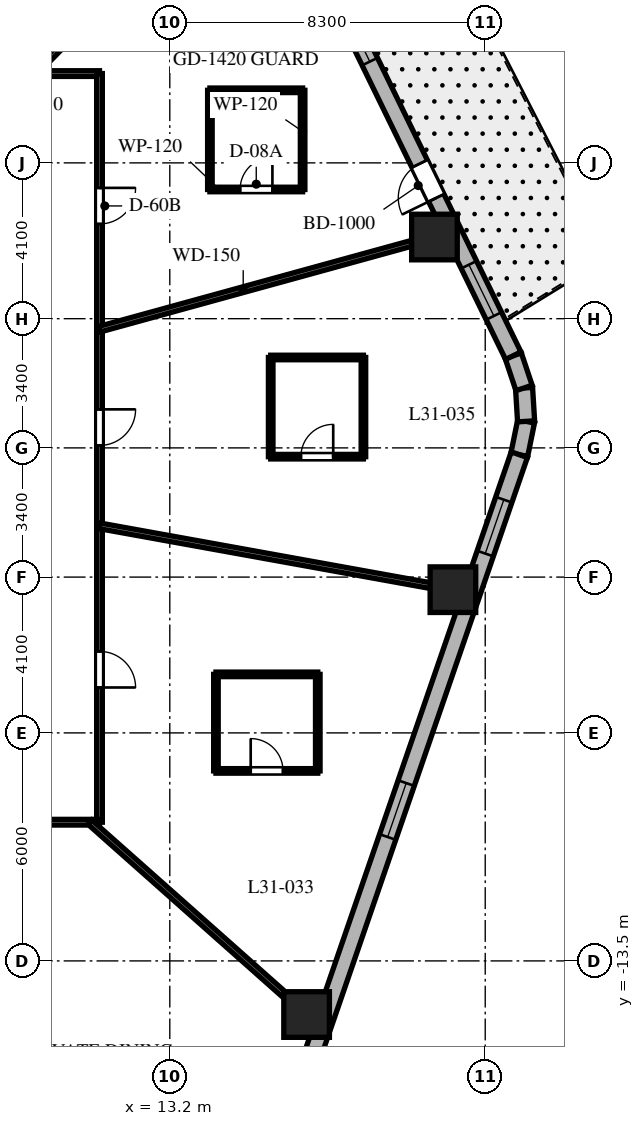
"""IFC4 building model, lengths in metres.
Left out: names, types, materials, properties, quantities, classifications, styles, units other than length and angle.
Written with IfcOpenShell. Run it as: python <this file> out.ifc"""

import sys

from ifc_helpers import new_model, si_unit, direction, frame, frame_2d, origin, origin_2d, place, context, subcontext, project, spatial, rectangle, extrude, element, fill, save


model = new_model("IFC4")
c1 = context("Model", 3, precision=1e-05, world=origin(), true_north=direction((0.0, 1.0)))
c2 = subcontext(c1, "Body", "Model", "MODEL_VIEW")
j1 = project(units=[si_unit("LENGTHUNIT", "METRE"), si_unit("PLANEANGLEUNIT", "RADIAN")], contexts=[c1])
p1 = place(None, origin())
s1 = spatial("IfcSite", under=j1, at=p1, CompositionType="ELEMENT")
p2 = place(p1, origin())
s2 = spatial("IfcBuilding", under=s1, at=p2, CompositionType="ELEMENT")
p3 = place(p2, frame((0.0, 0.0, 128.4)))
s3 = spatial("IfcBuildingStorey", under=s2, at=p3, CompositionType="ELEMENT", Elevation=128.4)
for number, where, z_axis, x_axis in (
    (1, (16.8, -14.911, 0.0), (0.0, 0.0, 1.0), (1.0, 0.0, 0.0)),
    (2, (20.65, -3.731, 0.0), (0.0, 0.0, 1.0), (1.0, 0.0, 0.0)),
    (3, (20.164, 5.549, 0.0), (0.0, 0.0, 1.0), (1.0, 0.0, 0.0)),
):
    element("IfcColumn", number, at=place(p3, frame(where, z_axis=z_axis, x_axis=x_axis)), inside=s3, PredefinedType="COLUMN", context=c2, shape_type="SweptSolid", body=[
        extrude(rectangle(XDim=1.2, YDim=1.2, at=origin_2d()), origin(), (0.0, 0.0, 1.0), 3.7),
    ])
p4 = place(p3, frame((22.397, -0.179, 0.0), z_axis=(0.0, 0.0, 1.0), x_axis=(0.199313589404, 0.979935759669, 0.0)))
e4 = element("IfcWall", 4, at=p4, inside=s3, PredefinedType="SOLIDWALL", context=c2, shape_type="SweptSolid", body=[
    extrude(rectangle(XDim=0.896, YDim=0.45, at=frame_2d((0.448, 0.0))), origin(), (0.0, 0.0, 1.0), 3.4),
])
p5 = place(p3, frame((22.575, 0.698, 0.0), z_axis=(0.0, 0.0, 1.0), x_axis=(-0.060980441946, 0.998138961117, 0.0)))
e5 = element("IfcWall", 5, at=p5, inside=s3, PredefinedType="SOLIDWALL", context=c2, shape_type="SweptSolid", body=[
    extrude(rectangle(XDim=0.881, YDim=0.45, at=frame_2d((0.44, 0.0))), origin(), (0.0, 0.0, 1.0), 3.4),
])
p6 = place(p3, frame((22.522, 1.577, 0.0), z_axis=(0.0, 0.0, 1.0), x_axis=(-0.317372694837, 0.948300887151, 0.0)))
e6 = element("IfcWall", 6, at=p6, inside=s3, PredefinedType="SOLIDWALL", context=c2, shape_type="SweptSolid", body=[
    extrude(rectangle(XDim=0.896, YDim=0.45, at=frame_2d((0.448, 0.0))), origin(), (0.0, 0.0, 1.0), 3.4),
])
p7 = place(p3, frame((15.992, -18.777, 0.0), z_axis=(0.0, 0.0, 1.0), x_axis=(0.325606988926, 0.945505202927, 0.0)))
e7 = element("IfcWall", 7, at=p7, inside=s3, PredefinedType="SOLIDWALL", context=c2, shape_type="SweptSolid", body=[
    extrude(rectangle(XDim=19.669, YDim=0.45, at=frame_2d((9.835, 0.0))), origin(), (0.0, 0.0, 1.0), 3.4),
])
p8 = place(p7, frame((1.197, 0.0, 0.8)))
e8 = element("IfcOpeningElement", 8, at=p8, cuts=e7, PredefinedType="OPENING", context=c2, shape_type="SweptSolid", body=[
    extrude(rectangle(XDim=1.5, YDim=1.8, at=frame_2d((0.75, 0.9))), frame((0.0, 0.235, 0.0), z_axis=(0.0, -1.0, 0.0), x_axis=(1.0, 0.0, 0.0)), (0.0, 0.0, 1.0), 0.47),
])
p9 = place(p7, frame((9.03, 0.0, 0.8)))
e9 = element("IfcOpeningElement", 9, at=p9, cuts=e7, PredefinedType="OPENING", context=c2, shape_type="SweptSolid", body=[
    extrude(rectangle(XDim=1.5, YDim=1.8, at=frame_2d((0.75, 0.9))), frame((0.0, 0.235, 0.0), z_axis=(0.0, -1.0, 0.0), x_axis=(1.0, 0.0, 0.0)), (0.0, 0.0, 1.0), 0.47),
])
p10 = place(p7, frame((16.918, 0.0, 0.8)))
e10 = element("IfcOpeningElement", 10, at=p10, cuts=e7, PredefinedType="OPENING", context=c2, shape_type="SweptSolid", body=[
    extrude(rectangle(XDim=1.5, YDim=1.8, at=frame_2d((0.75, 0.9))), frame((0.0, 0.235, 0.0), z_axis=(0.0, -1.0, 0.0), x_axis=(1.0, 0.0, 0.0)), (0.0, 0.0, 1.0), 0.47),
])
p11 = place(p3, frame((22.238, 2.427, 0.0), z_axis=(0.0, 0.0, 1.0), x_axis=(-0.438374803278, 0.898792262901, 0.0)))
e11 = element("IfcWall", 11, at=p11, inside=s3, PredefinedType="SOLIDWALL", context=c2, shape_type="SweptSolid", body=[
    extrude(rectangle(XDim=18.618, YDim=0.45, at=frame_2d((9.309, 0.0))), origin(), (0.0, 0.0, 1.0), 3.4),
])
p12 = place(p11, frame((4.62, 0.0, 0.0)))
e12 = element("IfcOpeningElement", 12, at=p12, cuts=e11, PredefinedType="OPENING", context=c2, shape_type="SweptSolid", body=[
    extrude(rectangle(XDim=1.0, YDim=2.15, at=frame_2d((0.5, 1.075))), frame((0.0, 0.235, 0.0), z_axis=(0.0, -1.0, 0.0), x_axis=(1.0, 0.0, 0.0)), (0.0, 0.0, 1.0), 0.47),
])
p13 = place(p11, frame((8.61, 0.0, 0.8)))
e13 = element("IfcOpeningElement", 13, at=p13, cuts=e11, PredefinedType="OPENING", context=c2, shape_type="SweptSolid", body=[
    extrude(rectangle(XDim=1.5, YDim=1.8, at=frame_2d((0.75, 0.9))), frame((0.0, 0.235, 0.0), z_axis=(0.0, -1.0, 0.0), x_axis=(1.0, 0.0, 0.0)), (0.0, 0.0, 1.0), 0.47),
])
p14 = place(p11, frame((16.006, 0.0, 0.8)))
e14 = element("IfcOpeningElement", 14, at=p14, cuts=e11, PredefinedType="OPENING", context=c2, shape_type="SweptSolid", body=[
    extrude(rectangle(XDim=1.5, YDim=1.8, at=frame_2d((0.75, 0.9))), frame((0.0, 0.235, 0.0), z_axis=(0.0, -1.0, 0.0), x_axis=(1.0, 0.0, 0.0)), (0.0, 0.0, 1.0), 0.47),
])
p15 = place(p11, frame((1.163, 0.0, 0.8)))
e15 = element("IfcOpeningElement", 15, at=p15, cuts=e11, PredefinedType="OPENING", context=c2, shape_type="SweptSolid", body=[
    extrude(rectangle(XDim=1.5, YDim=1.8, at=frame_2d((0.75, 0.9))), frame((0.0, 0.235, 0.0), z_axis=(0.0, -1.0, 0.0), x_axis=(1.0, 0.0, 0.0)), (0.0, 0.0, 1.0), 0.47),
])
p16 = place(p3, frame((-11.35, 9.85, 0.0), z_axis=(0.0, 0.0, 1.0), x_axis=(1.0, 0.0, 0.0)))
e16 = element("IfcWall", 16, at=p16, inside=s3, PredefinedType="PARTITIONING", context=c2, shape_type="SweptSolid", body=[
    extrude(rectangle(XDim=22.7, YDim=0.15, at=frame_2d((11.35, 0.0))), origin(), (0.0, 0.0, 1.0), 2.84),
])
p17 = place(p16, frame((17.237, 0.0, 0.0)))
e17 = element("IfcOpeningElement", 17, at=p17, cuts=e16, PredefinedType="OPENING", context=c2, shape_type="SweptSolid", body=[
    extrude(rectangle(XDim=0.95, YDim=2.03, at=frame_2d((0.475, 1.015))), frame((0.0, 0.085, 0.0), z_axis=(0.0, -1.0, 0.0), x_axis=(1.0, 0.0, 0.0)), (0.0, 0.0, 1.0), 0.17),
])
p18 = place(p16, frame((11.994, 0.0, 0.0)))
e18 = element("IfcOpeningElement", 18, at=p18, cuts=e16, PredefinedType="OPENING", context=c2, shape_type="SweptSolid", body=[
    extrude(rectangle(XDim=0.95, YDim=2.03, at=frame_2d((0.475, 1.015))), frame((0.0, 0.085, 0.0), z_axis=(0.0, -1.0, 0.0), x_axis=(1.0, 0.0, 0.0)), (0.0, 0.0, 1.0), 0.17),
])
p19 = place(p16, frame((8.559, 0.0, 0.0)))
e19 = element("IfcOpeningElement", 19, at=p19, cuts=e16, PredefinedType="OPENING", context=c2, shape_type="SweptSolid", body=[
    extrude(rectangle(XDim=0.95, YDim=2.03, at=frame_2d((0.475, 1.015))), frame((0.0, 0.085, 0.0), z_axis=(0.0, -1.0, 0.0), x_axis=(1.0, 0.0, 0.0)), (0.0, 0.0, 1.0), 0.17),
])
p20 = place(p16, frame((3.399, 0.0, 0.0)))
e20 = element("IfcOpeningElement", 20, at=p20, cuts=e16, PredefinedType="OPENING", context=c2, shape_type="SweptSolid", body=[
    extrude(rectangle(XDim=0.95, YDim=2.03, at=frame_2d((0.475, 1.015))), frame((0.0, 0.085, 0.0), z_axis=(0.0, -1.0, 0.0), x_axis=(1.0, 0.0, 0.0)), (0.0, 0.0, 1.0), 0.17),
])
p21 = place(p3, frame((11.35, 9.85, 0.0), z_axis=(0.0, 0.0, 1.0), x_axis=(0.0, -1.0, 0.0)))
e21 = element("IfcWall", 21, at=p21, inside=s3, PredefinedType="PARTITIONING", context=c2, shape_type="SweptSolid", body=[
    extrude(rectangle(XDim=19.7, YDim=0.15, at=frame_2d((9.85, 0.0))), origin(), (0.0, 0.0, 1.0), 2.84),
])
p22 = place(p21, frame((3.008, 0.0, 0.0)))
e22 = element("IfcOpeningElement", 22, at=p22, cuts=e21, PredefinedType="OPENING", context=c2, shape_type="SweptSolid", body=[
    extrude(rectangle(XDim=0.95, YDim=2.03, at=frame_2d((0.475, 1.015))), frame((0.0, 0.085, 0.0), z_axis=(0.0, -1.0, 0.0), x_axis=(1.0, 0.0, 0.0)), (0.0, 0.0, 1.0), 0.17),
])
p23 = place(p21, frame((15.205, 0.0, 0.0)))
e23 = element("IfcOpeningElement", 23, at=p23, cuts=e21, PredefinedType="OPENING", context=c2, shape_type="SweptSolid", body=[
    extrude(rectangle(XDim=0.95, YDim=2.03, at=frame_2d((0.475, 1.015))), frame((0.0, 0.085, 0.0), z_axis=(0.0, -1.0, 0.0), x_axis=(1.0, 0.0, 0.0)), (0.0, 0.0, 1.0), 0.17),
])
p24 = place(p21, frame((8.836, 0.0, 0.0)))
e24 = element("IfcOpeningElement", 24, at=p24, cuts=e21, PredefinedType="OPENING", context=c2, shape_type="SweptSolid", body=[
    extrude(rectangle(XDim=0.95, YDim=2.03, at=frame_2d((0.475, 1.015))), frame((0.0, 0.085, 0.0), z_axis=(0.0, -1.0, 0.0), x_axis=(1.0, 0.0, 0.0)), (0.0, 0.0, 1.0), 0.17),
])
p25 = place(p3, frame((11.35, -9.85, 0.0), z_axis=(0.0, 0.0, 1.0), x_axis=(-1.0, 0.0, 0.0)))
e25 = element("IfcWall", 25, at=p25, inside=s3, PredefinedType="PARTITIONING", context=c2, shape_type="SweptSolid", body=[
    extrude(rectangle(XDim=22.7, YDim=0.15, at=frame_2d((11.35, 0.0))), origin(), (0.0, 0.0, 1.0), 2.84),
])
p26 = place(p25, frame((17.237, 0.0, 0.0)))
e26 = element("IfcOpeningElement", 26, at=p26, cuts=e25, PredefinedType="OPENING", context=c2, shape_type="SweptSolid", body=[
    extrude(rectangle(XDim=0.95, YDim=2.03, at=frame_2d((0.475, 1.015))), frame((0.0, 0.085, 0.0), z_axis=(0.0, -1.0, 0.0), x_axis=(1.0, 0.0, 0.0)), (0.0, 0.0, 1.0), 0.17),
])
p27 = place(p25, frame((10.45, 0.0, 0.0)))
e27 = element("IfcOpeningElement", 27, at=p27, cuts=e25, PredefinedType="OPENING", context=c2, shape_type="SweptSolid", body=[
    extrude(rectangle(XDim=0.95, YDim=2.03, at=frame_2d((0.475, 1.015))), frame((0.0, 0.085, 0.0), z_axis=(0.0, -1.0, 0.0), x_axis=(1.0, 0.0, 0.0)), (0.0, 0.0, 1.0), 0.17),
])
p28 = place(p25, frame((3.399, 0.0, 0.0)))
e28 = element("IfcOpeningElement", 28, at=p28, cuts=e25, PredefinedType="OPENING", context=c2, shape_type="SweptSolid", body=[
    extrude(rectangle(XDim=0.95, YDim=2.03, at=frame_2d((0.475, 1.015))), frame((0.0, 0.085, 0.0), z_axis=(0.0, -1.0, 0.0), x_axis=(1.0, 0.0, 0.0)), (0.0, 0.0, 1.0), 0.17),
])
p29 = place(p3, frame((11.35, 3.123, 0.0), z_axis=(0.0, 0.0, 1.0), x_axis=(0.964151983214, 0.265350623261, 0.0)))
e29 = element("IfcWall", 29, at=p29, inside=s3, PredefinedType="PARTITIONING", context=c2, shape_type="SweptSolid", body=[
    extrude(rectangle(XDim=9.645, YDim=0.15, at=frame_2d((4.823, 0.0))), origin(), (0.0, 0.0, 1.0), 2.54),
])
p30 = place(p3, frame((9.628, 9.85, 0.0), z_axis=(0.0, 0.0, 1.0), x_axis=(0.698992824326, 0.715128681805, 0.0)))
e30 = element("IfcWall", 30, at=p30, inside=s3, PredefinedType="PARTITIONING", context=c2, shape_type="SweptSolid", body=[
    extrude(rectangle(XDim=8.579, YDim=0.15, at=frame_2d((4.29, 0.0))), origin(), (0.0, 0.0, 1.0), 2.54),
])
p31 = place(p3, frame((11.098, -9.85, 0.0), z_axis=(0.0, 0.0, 1.0), x_axis=(0.747904295103, -0.663806572253, 0.0)))
e31 = element("IfcWall", 31, at=p31, inside=s3, PredefinedType="PARTITIONING", context=c2, shape_type="SweptSolid", body=[
    extrude(rectangle(XDim=8.16, YDim=0.15, at=frame_2d((4.08, 0.0))), origin(), (0.0, 0.0, 1.0), 2.54),
])
p32 = place(p3, frame((11.35, -2.051, 0.0), z_axis=(0.0, 0.0, 1.0), x_axis=(0.984068313063, -0.177790762484, 0.0)))
e32 = element("IfcWall", 32, at=p32, inside=s3, PredefinedType="PARTITIONING", context=c2, shape_type="SweptSolid", body=[
    extrude(rectangle(XDim=9.951, YDim=0.15, at=frame_2d((4.976, 0.0))), origin(), (0.0, 0.0, 1.0), 2.54),
])
p33 = place(p3, frame((14.255, 6.8, 0.0), z_axis=(0.0, 0.0, 1.0), x_axis=(1.0, 0.0, 0.0)))
e33 = element("IfcWall", 33, at=p33, inside=s3, PredefinedType="PARTITIONING", context=c2, shape_type="SweptSolid", body=[
    extrude(rectangle(XDim=2.44, YDim=0.12, at=frame_2d((1.22, 0.0))), origin(), (0.0, 0.0, 1.0), 2.927),
])
p34 = place(p33, frame((0.795, 0.0, 0.0)))
e34 = element("IfcOpeningElement", 34, at=p34, cuts=e33, PredefinedType="OPENING", context=c2, shape_type="SweptSolid", body=[
    extrude(rectangle(XDim=0.85, YDim=2.03, at=frame_2d((0.425, 1.015))), frame((0.0, 0.07, 0.0), z_axis=(0.0, -1.0, 0.0), x_axis=(1.0, 0.0, 0.0)), (0.0, 0.0, 1.0), 0.14),
])
p35 = place(p3, frame((16.695, 6.8, 0.0), z_axis=(0.0, 0.0, 1.0), x_axis=(0.0, 1.0, 0.0)))
e35 = element("IfcWall", 35, at=p35, inside=s3, PredefinedType="PARTITIONING", context=c2, shape_type="SweptSolid", body=[
    extrude(rectangle(XDim=2.61, YDim=0.12, at=frame_2d((1.305, 0.0))), origin(), (0.0, 0.0, 1.0), 3.4),
])
p36 = place(p3, frame((16.695, 9.41, 0.0), z_axis=(0.0, 0.0, 1.0), x_axis=(-1.0, 0.0, 0.0)))
e36 = element("IfcWall", 36, at=p36, inside=s3, PredefinedType="PARTITIONING", context=c2, shape_type="SweptSolid", body=[
    extrude(rectangle(XDim=2.44, YDim=0.12, at=frame_2d((1.22, 0.0))), origin(), (0.0, 0.0, 1.0), 2.927),
])
p37 = place(p3, frame((14.255, 9.41, 0.0), z_axis=(0.0, 0.0, 1.0), x_axis=(0.0, -1.0, 0.0)))
e37 = element("IfcWall", 37, at=p37, inside=s3, PredefinedType="PARTITIONING", context=c2, shape_type="SweptSolid", body=[
    extrude(rectangle(XDim=2.61, YDim=0.12, at=frame_2d((1.305, 0.0))), origin(), (0.0, 0.0, 1.0), 3.4),
])
p38 = place(p3, frame((14.414, -8.5, 0.0), z_axis=(0.0, 0.0, 1.0), x_axis=(1.0, 0.0, 0.0)))
e38 = element("IfcWall", 38, at=p38, inside=s3, PredefinedType="PARTITIONING", context=c2, shape_type="SweptSolid", body=[
    extrude(rectangle(XDim=2.68, YDim=0.12, at=frame_2d((1.34, 0.0))), origin(), (0.0, 0.0, 1.0), 2.972),
])
p39 = place(p38, frame((0.915, 0.0, 0.0)))
e39 = element("IfcOpeningElement", 39, at=p39, cuts=e38, PredefinedType="OPENING", context=c2, shape_type="SweptSolid", body=[
    extrude(rectangle(XDim=0.85, YDim=2.03, at=frame_2d((0.425, 1.015))), frame((0.0, 0.07, 0.0), z_axis=(0.0, -1.0, 0.0), x_axis=(1.0, 0.0, 0.0)), (0.0, 0.0, 1.0), 0.14),
])
p40 = place(p3, frame((17.094, -8.5, 0.0), z_axis=(0.0, 0.0, 1.0), x_axis=(0.0, 1.0, 0.0)))
e40 = element("IfcWall", 40, at=p40, inside=s3, PredefinedType="PARTITIONING", context=c2, shape_type="SweptSolid", body=[
    extrude(rectangle(XDim=2.54, YDim=0.12, at=frame_2d((1.27, 0.0))), origin(), (0.0, 0.0, 1.0), 3.4),
])
p41 = place(p3, frame((17.094, -5.96, 0.0), z_axis=(0.0, 0.0, 1.0), x_axis=(-1.0, 0.0, 0.0)))
e41 = element("IfcWall", 41, at=p41, inside=s3, PredefinedType="PARTITIONING", context=c2, shape_type="SweptSolid", body=[
    extrude(rectangle(XDim=2.68, YDim=0.12, at=frame_2d((1.34, 0.0))), origin(), (0.0, 0.0, 1.0), 2.972),
])
p42 = place(p3, frame((14.414, -5.96, 0.0), z_axis=(0.0, 0.0, 1.0), x_axis=(0.0, -1.0, 0.0)))
e42 = element("IfcWall", 42, at=p42, inside=s3, PredefinedType="PARTITIONING", context=c2, shape_type="SweptSolid", body=[
    extrude(rectangle(XDim=2.54, YDim=0.12, at=frame_2d((1.27, 0.0))), origin(), (0.0, 0.0, 1.0), 3.4),
])
p43 = place(p3, frame((15.855, -0.231, 0.0), z_axis=(0.0, 0.0, 1.0), x_axis=(1.0, 0.0, 0.0)))
e43 = element("IfcWall", 43, at=p43, inside=s3, PredefinedType="PARTITIONING", context=c2, shape_type="SweptSolid", body=[
    extrude(rectangle(XDim=2.44, YDim=0.12, at=frame_2d((1.22, 0.0))), origin(), (0.0, 0.0, 1.0), 2.841),
])
p44 = place(p43, frame((0.795, 0.0, 0.0)))
e44 = element("IfcOpeningElement", 44, at=p44, cuts=e43, PredefinedType="OPENING", context=c2, shape_type="SweptSolid", body=[
    extrude(rectangle(XDim=0.85, YDim=2.03, at=frame_2d((0.425, 1.015))), frame((0.0, 0.07, 0.0), z_axis=(0.0, -1.0, 0.0), x_axis=(1.0, 0.0, 0.0)), (0.0, 0.0, 1.0), 0.14),
])
p45 = place(p3, frame((18.295, -0.231, 0.0), z_axis=(0.0, 0.0, 1.0), x_axis=(0.0, 1.0, 0.0)))
e45 = element("IfcWall", 45, at=p45, inside=s3, PredefinedType="PARTITIONING", context=c2, shape_type="SweptSolid", body=[
    extrude(rectangle(XDim=2.61, YDim=0.12, at=frame_2d((1.305, 0.0))), origin(), (0.0, 0.0, 1.0), 3.4),
])
p46 = place(p3, frame((18.295, 2.379, 0.0), z_axis=(0.0, 0.0, 1.0), x_axis=(-1.0, 0.0, 0.0)))
e46 = element("IfcWall", 46, at=p46, inside=s3, PredefinedType="PARTITIONING", context=c2, shape_type="SweptSolid", body=[
    extrude(rectangle(XDim=2.44, YDim=0.12, at=frame_2d((1.22, 0.0))), origin(), (0.0, 0.0, 1.0), 2.841),
])
p47 = place(p3, frame((15.855, 2.379, 0.0), z_axis=(0.0, 0.0, 1.0), x_axis=(0.0, -1.0, 0.0)))
e47 = element("IfcWall", 47, at=p47, inside=s3, PredefinedType="PARTITIONING", context=c2, shape_type="SweptSolid", body=[
    extrude(rectangle(XDim=2.61, YDim=0.12, at=frame_2d((1.305, 0.0))), origin(), (0.0, 0.0, 1.0), 3.4),
])
p48 = place(p9, origin())
e48 = element("IfcWindow", 48, at=p48, inside=s3, PartitioningType="SINGLE_PANEL", PredefinedType="WINDOW", context=c2, shape_type="SweptSolid", body=[
    extrude(rectangle(XDim=1.5, YDim=1.8, at=frame_2d((0.75, 0.9))), frame((0.0, 0.03, 0.0), z_axis=(0.0, -1.0, 0.0), x_axis=(1.0, 0.0, 0.0)), (0.0, 0.0, 1.0), 0.06),
])
fill(e9, e48)
p49 = place(p10, origin())
e49 = element("IfcWindow", 49, at=p49, inside=s3, PartitioningType="SINGLE_PANEL", PredefinedType="WINDOW", context=c2, shape_type="SweptSolid", body=[
    extrude(rectangle(XDim=1.5, YDim=1.8, at=frame_2d((0.75, 0.9))), frame((0.0, 0.03, 0.0), z_axis=(0.0, -1.0, 0.0), x_axis=(1.0, 0.0, 0.0)), (0.0, 0.0, 1.0), 0.06),
])
fill(e10, e49)
p50 = place(p12, origin())
e50 = element("IfcDoor", 50, at=p50, inside=s3, OperationType="SINGLE_SWING_LEFT", PredefinedType="DOOR", context=c2, shape_type="SweptSolid", body=[
    extrude(rectangle(XDim=1.0, YDim=2.15, at=frame_2d((0.5, 1.075))), frame((0.0, 0.025, 0.0), z_axis=(0.0, -1.0, 0.0), x_axis=(1.0, 0.0, 0.0)), (0.0, 0.0, 1.0), 0.05),
])
fill(e12, e50)
p51 = place(p13, origin())
e51 = element("IfcWindow", 51, at=p51, inside=s3, PartitioningType="SINGLE_PANEL", PredefinedType="WINDOW", context=c2, shape_type="SweptSolid", body=[
    extrude(rectangle(XDim=1.5, YDim=1.8, at=frame_2d((0.75, 0.9))), frame((0.0, 0.03, 0.0), z_axis=(0.0, -1.0, 0.0), x_axis=(1.0, 0.0, 0.0)), (0.0, 0.0, 1.0), 0.06),
])
fill(e13, e51)
p52 = place(p15, origin())
e52 = element("IfcWindow", 52, at=p52, inside=s3, PartitioningType="SINGLE_PANEL", PredefinedType="WINDOW", context=c2, shape_type="SweptSolid", body=[
    extrude(rectangle(XDim=1.5, YDim=1.8, at=frame_2d((0.75, 0.9))), frame((0.0, 0.03, 0.0), z_axis=(0.0, -1.0, 0.0), x_axis=(1.0, 0.0, 0.0)), (0.0, 0.0, 1.0), 0.06),
])
fill(e15, e52)
p53 = place(p22, origin())
e53 = element("IfcDoor", 53, at=p53, inside=s3, OperationType="SINGLE_SWING_LEFT", PredefinedType="DOOR", context=c2, shape_type="SweptSolid", body=[
    extrude(rectangle(XDim=0.95, YDim=2.03, at=frame_2d((0.475, 1.015))), frame((0.0, 0.025, 0.0), z_axis=(0.0, -1.0, 0.0), x_axis=(1.0, 0.0, 0.0)), (0.0, 0.0, 1.0), 0.05),
])
fill(e22, e53)
p54 = place(p34, origin())
e54 = element("IfcDoor", 54, at=p54, inside=s3, OperationType="SINGLE_SWING_RIGHT", PredefinedType="DOOR", context=c2, shape_type="SweptSolid", body=[
    extrude(rectangle(XDim=0.85, YDim=2.03, at=frame_2d((0.425, 1.015))), frame((0.0, 0.025, 0.0), z_axis=(0.0, -1.0, 0.0), x_axis=(1.0, 0.0, 0.0)), (0.0, 0.0, 1.0), 0.05),
])
fill(e34, e54)
p55 = place(p23, origin())
e55 = element("IfcDoor", 55, at=p55, inside=s3, OperationType="SINGLE_SWING_RIGHT", PredefinedType="DOOR", context=c2, shape_type="SweptSolid", body=[
    extrude(rectangle(XDim=0.95, YDim=2.03, at=frame_2d((0.475, 1.015))), frame((0.0, 0.025, 0.0), z_axis=(0.0, -1.0, 0.0), x_axis=(1.0, 0.0, 0.0)), (0.0, 0.0, 1.0), 0.05),
])
fill(e23, e55)
p56 = place(p39, origin())
e56 = element("IfcDoor", 56, at=p56, inside=s3, OperationType="SINGLE_SWING_LEFT", PredefinedType="DOOR", context=c2, shape_type="SweptSolid", body=[
    extrude(rectangle(XDim=0.85, YDim=2.03, at=frame_2d((0.425, 1.015))), frame((0.0, 0.025, 0.0), z_axis=(0.0, -1.0, 0.0), x_axis=(1.0, 0.0, 0.0)), (0.0, 0.0, 1.0), 0.05),
])
fill(e39, e56)
p57 = place(p24, origin())
e57 = element("IfcDoor", 57, at=p57, inside=s3, OperationType="SINGLE_SWING_LEFT", PredefinedType="DOOR", context=c2, shape_type="SweptSolid", body=[
    extrude(rectangle(XDim=0.95, YDim=2.03, at=frame_2d((0.475, 1.015))), frame((0.0, 0.025, 0.0), z_axis=(0.0, -1.0, 0.0), x_axis=(1.0, 0.0, 0.0)), (0.0, 0.0, 1.0), 0.05),
])
fill(e24, e57)
p58 = place(p44, origin())
e58 = element("IfcDoor", 58, at=p58, inside=s3, OperationType="SINGLE_SWING_RIGHT", PredefinedType="DOOR", context=c2, shape_type="SweptSolid", body=[
    extrude(rectangle(XDim=0.85, YDim=2.03, at=frame_2d((0.425, 1.015))), frame((0.0, 0.025, 0.0), z_axis=(0.0, -1.0, 0.0), x_axis=(1.0, 0.0, 0.0)), (0.0, 0.0, 1.0), 0.05),
])
fill(e44, e58)
save(model, sys.argv[1])
